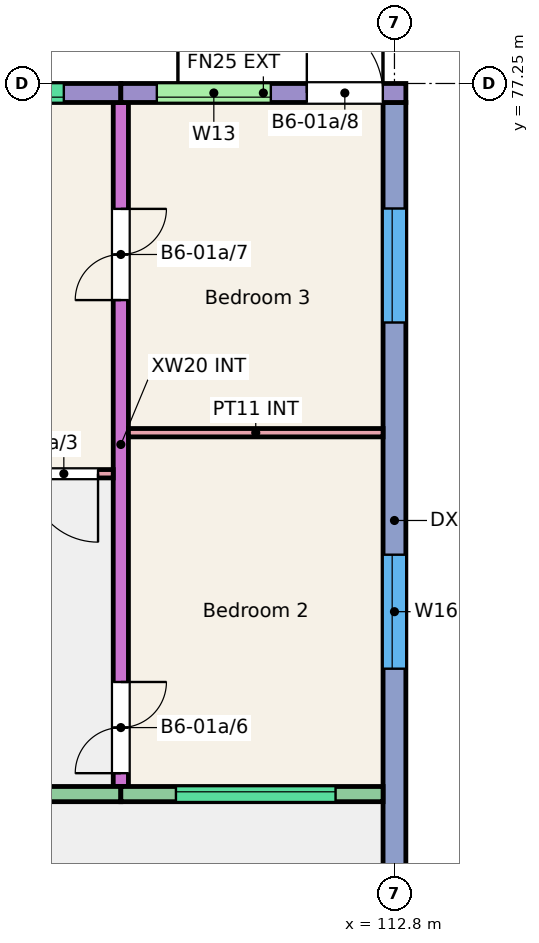
"""IFC4 building model, lengths in metres.
Left out: names, types, materials, properties, quantities, classifications, styles, units other than length and angle.
Written with IfcOpenShell. Run it as: python <this file> out.ifc"""

import sys

from ifc_helpers import new_model, si_unit, direction, frame, frame_2d, origin, place, context, subcontext, project, spatial, rectangle, extrude, element, fill, save


model = new_model("IFC4")
c1 = context("Model", 3, precision=1e-05, world=origin(), true_north=direction((0.0, 1.0)))
c2 = subcontext(c1, "Body", "Model", "MODEL_VIEW")
j1 = project(units=[si_unit("LENGTHUNIT", "METRE"), si_unit("PLANEANGLEUNIT", "RADIAN")], contexts=[c1])
p1 = place(None, origin())
s1 = spatial("IfcSite", under=j1, at=p1, CompositionType="ELEMENT")
p2 = place(p1, origin())
s2 = spatial("IfcBuilding", under=s1, at=p2, CompositionType="ELEMENT")
p3 = place(p2, frame((0.0, 0.0, 3.0)))
s3 = spatial("IfcBuildingStorey", under=s2, at=p3, CompositionType="ELEMENT", Elevation=3.0)
p4 = place(p3, frame((109.2, 68.0, 0.0), z_axis=(0.0, 0.0, 1.0), x_axis=(0.0, 1.0, 0.0)))
e1 = element("IfcWall", 1, at=p4, inside=s3, PredefinedType="SHEAR", context=c2, shape_type="SweptSolid", body=[
    extrude(rectangle(XDim=9.0, YDim=0.2, at=frame_2d((4.5, 0.0))), origin(), (0.0, 0.0, 1.0), 3.0),
])
p5 = place(p4, frame((0.175, 0.0, 0.0)))
e2 = element("IfcOpeningElement", 2, at=p5, cuts=e1, PredefinedType="OPENING", context=c2, shape_type="SweptSolid", body=[
    extrude(rectangle(XDim=1.2, YDim=2.1, at=frame_2d((0.6, 1.05))), frame((0.0, 0.11, 0.0), z_axis=(0.0, -1.0, 0.0), x_axis=(1.0, 0.0, 0.0)), (0.0, 0.0, 1.0), 0.22),
])
p6 = place(p4, frame((6.4, 0.0, 0.0)))
e3 = element("IfcOpeningElement", 3, at=p6, cuts=e1, PredefinedType="OPENING", context=c2, shape_type="SweptSolid", body=[
    extrude(rectangle(XDim=1.2, YDim=2.1, at=frame_2d((0.6, 1.05))), frame((0.0, 0.11, 0.0), z_axis=(0.0, -1.0, 0.0), x_axis=(1.0, 0.0, 0.0)), (0.0, 0.0, 1.0), 0.22),
])
p7 = place(p3, frame((112.8, 66.0, 0.0), z_axis=(0.0, 0.0, 1.0), x_axis=(0.0, 1.0, 0.0)))
e4 = element("IfcWall", 4, at=p7, inside=s3, PredefinedType="SHEAR", context=c2, shape_type="SweptSolid", body=[
    extrude(rectangle(XDim=11.0, YDim=0.3, at=frame_2d((5.5, 0.0))), origin(), (0.0, 0.0, 1.0), 3.0),
])
p8 = place(p7, frame((3.55, 0.0, 0.9)))
e5 = element("IfcOpeningElement", 5, at=p8, cuts=e4, PredefinedType="OPENING", context=c2, shape_type="SweptSolid", body=[
    extrude(rectangle(XDim=1.5, YDim=1.5, at=frame_2d((0.75, 0.75))), frame((0.0, 0.16, 0.0), z_axis=(0.0, -1.0, 0.0), x_axis=(1.0, 0.0, 0.0)), (0.0, 0.0, 1.0), 0.32),
])
p9 = place(p7, frame((8.105, 0.0, 0.9)))
e6 = element("IfcOpeningElement", 6, at=p9, cuts=e4, PredefinedType="OPENING", context=c2, shape_type="SweptSolid", body=[
    extrude(rectangle(XDim=1.5, YDim=1.5, at=frame_2d((0.75, 0.75))), frame((0.0, 0.16, 0.0), z_axis=(0.0, -1.0, 0.0), x_axis=(1.0, 0.0, 0.0)), (0.0, 0.0, 1.0), 0.32),
])
p10 = place(p3, frame((105.6, 77.125, 0.0), z_axis=(0.0, 0.0, 1.0), x_axis=(1.0, 0.0, 0.0)))
e7 = element("IfcWall", 7, at=p10, inside=s3, PredefinedType="SOLIDWALL", context=c2, shape_type="SweptSolid", body=[
    extrude(rectangle(XDim=3.6, YDim=0.25, at=frame_2d((1.8, 0.0))), origin(), (0.0, 0.0, 1.0), 3.0),
])
p11 = place(p10, frame((0.75, 0.0, 1.2)))
e8 = element("IfcOpeningElement", 8, at=p11, cuts=e7, PredefinedType="OPENING", context=c2, shape_type="SweptSolid", body=[
    extrude(rectangle(XDim=2.1, YDim=1.2, at=frame_2d((1.05, 0.6))), frame((0.0, 0.135, 0.0), z_axis=(0.0, -1.0, 0.0), x_axis=(1.0, 0.0, 0.0)), (0.0, 0.0, 1.0), 0.27),
])
p12 = place(p3, frame((105.6, 67.9, 0.0), z_axis=(0.0, 0.0, 1.0), x_axis=(1.0, 0.0, 0.0)))
e9 = element("IfcWall", 9, at=p12, inside=s3, PredefinedType="SOLIDWALL", context=c2, shape_type="SweptSolid", body=[
    extrude(rectangle(XDim=3.6, YDim=0.2, at=frame_2d((1.8, 0.0))), origin(), (0.0, 0.0, 1.0), 3.0),
])
p13 = place(p12, frame((1.3, 0.0, 0.0)))
e10 = element("IfcOpeningElement", 10, at=p13, cuts=e9, PredefinedType="OPENING", context=c2, shape_type="SweptSolid", body=[
    extrude(rectangle(XDim=1.0, YDim=2.1, at=frame_2d((0.5, 1.05))), frame((0.0, 0.11, 0.0), z_axis=(0.0, -1.0, 0.0), x_axis=(1.0, 0.0, 0.0)), (0.0, 0.0, 1.0), 0.22),
])
p14 = place(p3, frame((109.2, 77.125, 0.0), z_axis=(0.0, 0.0, 1.0), x_axis=(1.0, 0.0, 0.0)))
e11 = element("IfcWall", 11, at=p14, inside=s3, PredefinedType="SOLIDWALL", context=c2, shape_type="SweptSolid", body=[
    extrude(rectangle(XDim=3.75, YDim=0.25, at=frame_2d((1.875, 0.0))), origin(), (0.0, 0.0, 1.0), 3.0),
])
p15 = place(p14, frame((0.473, 0.0, 1.2)))
e12 = element("IfcOpeningElement", 12, at=p15, cuts=e11, PredefinedType="OPENING", context=c2, shape_type="SweptSolid", body=[
    extrude(rectangle(XDim=1.5, YDim=1.2, at=frame_2d((0.75, 0.6))), frame((0.0, 0.135, 0.0), z_axis=(0.0, -1.0, 0.0), x_axis=(1.0, 0.0, 0.0)), (0.0, 0.0, 1.0), 0.27),
])
p16 = place(p14, frame((2.447, 0.0, 0.0)))
e13 = element("IfcOpeningElement", 13, at=p16, cuts=e11, PredefinedType="OPENING", context=c2, shape_type="SweptSolid", body=[
    extrude(rectangle(XDim=1.0, YDim=2.1, at=frame_2d((0.5, 1.05))), frame((0.0, 0.135, 0.0), z_axis=(0.0, -1.0, 0.0), x_axis=(1.0, 0.0, 0.0)), (0.0, 0.0, 1.0), 0.27),
])
p17 = place(p3, frame((109.2, 67.9, 0.0), z_axis=(0.0, 0.0, 1.0), x_axis=(1.0, 0.0, 0.0)))
e14 = element("IfcWall", 14, at=p17, inside=s3, PredefinedType="SOLIDWALL", context=c2, shape_type="SweptSolid", body=[
    extrude(rectangle(XDim=3.45, YDim=0.2, at=frame_2d((1.725, 0.0))), origin(), (0.0, 0.0, 1.0), 3.0),
])
p18 = place(p17, frame((0.725, 0.0, 1.2)))
e15 = element("IfcOpeningElement", 15, at=p18, cuts=e14, PredefinedType="OPENING", context=c2, shape_type="SweptSolid", body=[
    extrude(rectangle(XDim=2.1, YDim=1.2, at=frame_2d((1.05, 0.6))), frame((0.0, 0.11, 0.0), z_axis=(0.0, -1.0, 0.0), x_axis=(1.0, 0.0, 0.0)), (0.0, 0.0, 1.0), 0.22),
])
p19 = place(p3, frame((105.7, 72.115, 0.0), z_axis=(0.0, 0.0, 1.0), x_axis=(1.0, 0.0, 0.0)))
e16 = element("IfcWall", 16, at=p19, inside=s3, PredefinedType="PARTITIONING", context=c2, shape_type="SweptSolid", body=[
    extrude(rectangle(XDim=3.4, YDim=0.11, at=frame_2d((1.7, 0.0))), origin(), (0.0, 0.0, 1.0), 2.8),
])
p20 = place(p19, frame((2.3, 0.0, 0.0)))
e17 = element("IfcOpeningElement", 17, at=p20, cuts=e16, PredefinedType="OPENING", context=c2, shape_type="SweptSolid", body=[
    extrude(rectangle(XDim=0.9, YDim=2.1, at=frame_2d((0.45, 1.05))), frame((0.0, 0.065, 0.0), z_axis=(0.0, -1.0, 0.0), x_axis=(1.0, 0.0, 0.0)), (0.0, 0.0, 1.0), 0.13),
])
p21 = place(p3, frame((109.3, 72.655, 0.0), z_axis=(0.0, 0.0, 1.0), x_axis=(1.0, 0.0, 0.0)))
e18 = element("IfcWall", 18, at=p21, inside=s3, PredefinedType="PARTITIONING", context=c2, shape_type="SweptSolid", body=[
    extrude(rectangle(XDim=3.35, YDim=0.11, at=frame_2d((1.675, 0.0))), origin(), (0.0, 0.0, 1.0), 2.8),
])
p22 = place(p18, origin())
e19 = element("IfcWindow", 19, at=p22, inside=s3, PartitioningType="SINGLE_PANEL", PredefinedType="WINDOW", context=c2, shape_type="SweptSolid", body=[
    extrude(rectangle(XDim=2.1, YDim=1.2, at=frame_2d((1.05, 0.6))), frame((0.0, 0.06, 0.0), z_axis=(0.0, -1.0, 0.0), x_axis=(1.0, 0.0, 0.0)), (0.0, 0.0, 1.0), 0.06),
])
fill(e15, e19)
p23 = place(p15, origin())
e20 = element("IfcWindow", 20, at=p23, inside=s3, PartitioningType="SINGLE_PANEL", PredefinedType="WINDOW", context=c2, shape_type="SweptSolid", body=[
    extrude(rectangle(XDim=1.5, YDim=1.2, at=frame_2d((0.75, 0.6))), frame((0.0, -0.025, 0.0), z_axis=(0.0, -1.0, 0.0), x_axis=(1.0, 0.0, 0.0)), (0.0, 0.0, 1.0), 0.06),
])
fill(e12, e20)
p24 = place(p11, origin())
e21 = element("IfcWindow", 21, at=p24, inside=s3, PartitioningType="SINGLE_PANEL", PredefinedType="WINDOW", context=c2, shape_type="SweptSolid", body=[
    extrude(rectangle(XDim=2.1, YDim=1.2, at=frame_2d((1.05, 0.6))), frame((0.0, -0.025, 0.0), z_axis=(0.0, -1.0, 0.0), x_axis=(1.0, 0.0, 0.0)), (0.0, 0.0, 1.0), 0.06),
])
fill(e8, e21)
p25 = place(p8, origin())
e22 = element("IfcWindow", 22, at=p25, inside=s3, PartitioningType="SINGLE_PANEL", PredefinedType="WINDOW", context=c2, shape_type="SweptSolid", body=[
    extrude(rectangle(XDim=1.5, YDim=1.5, at=frame_2d((0.75, 0.75))), frame((0.0, 0.06, 0.0), z_axis=(0.0, -1.0, 0.0), x_axis=(1.0, 0.0, 0.0)), (0.0, 0.0, 1.0), 0.06),
])
fill(e5, e22)
p26 = place(p9, origin())
e23 = element("IfcWindow", 23, at=p26, inside=s3, PartitioningType="SINGLE_PANEL", PredefinedType="WINDOW", context=c2, shape_type="SweptSolid", body=[
    extrude(rectangle(XDim=1.5, YDim=1.5, at=frame_2d((0.75, 0.75))), frame((0.0, 0.06, 0.0), z_axis=(0.0, -1.0, 0.0), x_axis=(1.0, 0.0, 0.0)), (0.0, 0.0, 1.0), 0.06),
])
fill(e6, e23)
p27 = place(p20, origin())
e24 = element("IfcDoor", 24, at=p27, inside=s3, OperationType="SINGLE_SWING_RIGHT", PredefinedType="DOOR", context=c2, shape_type="SweptSolid", body=[
    extrude(rectangle(XDim=0.9, YDim=2.1, at=frame_2d((0.45, 1.05))), frame((0.0, 0.025, 0.0), z_axis=(0.0, -1.0, 0.0), x_axis=(1.0, 0.0, 0.0)), (0.0, 0.0, 1.0), 0.05),
])
fill(e17, e24)
p28 = place(p5, origin())
e25 = element("IfcDoor", 25, at=p28, inside=s3, OperationType="DOUBLE_DOOR_SINGLE_SWING", PredefinedType="DOOR", context=c2, shape_type="SweptSolid", body=[
    extrude(rectangle(XDim=1.2, YDim=2.1, at=frame_2d((0.6, 1.05))), frame((0.0, 0.025, 0.0), z_axis=(0.0, -1.0, 0.0), x_axis=(1.0, 0.0, 0.0)), (0.0, 0.0, 1.0), 0.05),
])
fill(e2, e25)
p29 = place(p6, origin())
e26 = element("IfcDoor", 26, at=p29, inside=s3, OperationType="DOUBLE_DOOR_SINGLE_SWING", PredefinedType="DOOR", context=c2, shape_type="SweptSolid", body=[
    extrude(rectangle(XDim=1.2, YDim=2.1, at=frame_2d((0.6, 1.05))), frame((0.0, 0.025, 0.0), z_axis=(0.0, -1.0, 0.0), x_axis=(1.0, 0.0, 0.0)), (0.0, 0.0, 1.0), 0.05),
])
fill(e3, e26)
p30 = place(p16, origin())
e27 = element("IfcDoor", 27, at=p30, inside=s3, OperationType="SINGLE_SWING_LEFT", PredefinedType="DOOR", context=c2, shape_type="SweptSolid", body=[
    extrude(rectangle(XDim=1.0, YDim=2.1, at=frame_2d((0.5, 1.05))), frame((0.0, 0.025, 0.0), z_axis=(0.0, -1.0, 0.0), x_axis=(1.0, 0.0, 0.0)), (0.0, 0.0, 1.0), 0.05),
])
fill(e13, e27)
save(model, sys.argv[1])
